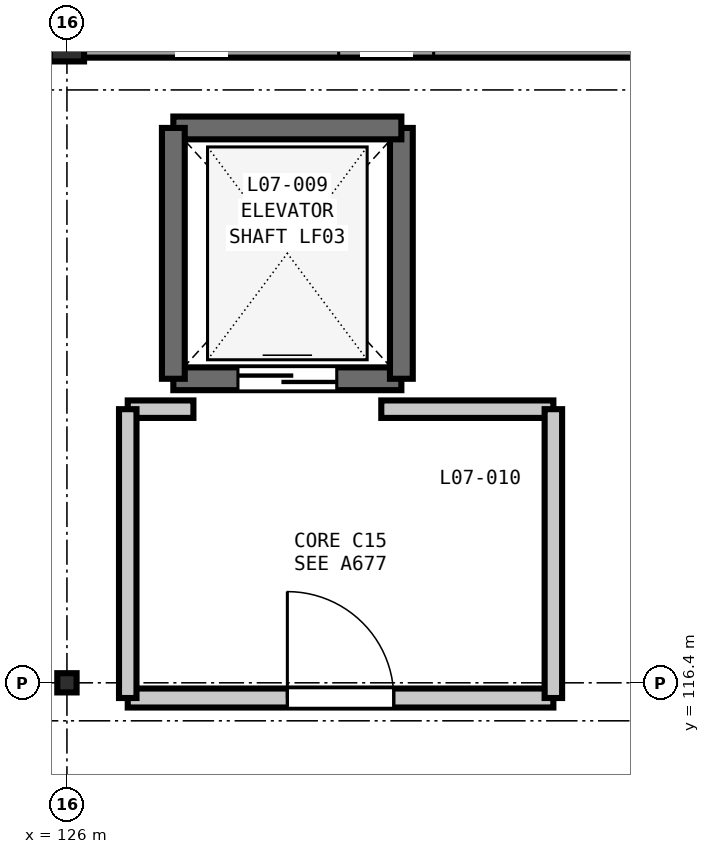
"""IFC4 building model, lengths in metres.
Left out: names, types, materials, properties, quantities, classifications, styles, units other than length and angle.
Written with IfcOpenShell. Run it as: python <this file> out.ifc"""

import sys

from ifc_helpers import new_model, si_unit, direction, frame, frame_2d, origin, origin_2d, place, context, subcontext, project, spatial, rectangle, i_section, extrude, element, fill, save


model = new_model("IFC4")
c1 = context("Model", 3, precision=1e-05, world=origin(), true_north=direction((0.0, 1.0)))
c2 = subcontext(c1, "Body", "Model", "MODEL_VIEW")
j1 = project(units=[si_unit("LENGTHUNIT", "METRE"), si_unit("PLANEANGLEUNIT", "RADIAN")], contexts=[c1])
p1 = place(None, origin())
s1 = spatial("IfcSite", under=j1, at=p1, CompositionType="ELEMENT")
p2 = place(p1, origin())
s2 = spatial("IfcBuilding", under=s1, at=p2, CompositionType="ELEMENT")
p3 = place(p2, frame((0.0, 0.0, 33.0)))
s3 = spatial("IfcBuildingStorey", under=s2, at=p3, CompositionType="ELEMENT", Elevation=33.0)
p4 = place(p3, frame((126.0, 116.4, 0.0), z_axis=(0.0, 0.0, 1.0), x_axis=(1.0, 0.0, 0.0)))
e1 = element("IfcColumn", 1, at=p4, inside=s3, PredefinedType="COLUMN", context=c2, shape_type="SweptSolid", body=[
    extrude(i_section(OverallWidth=0.254, OverallDepth=0.253, WebThickness=0.009, FlangeThickness=0.014, FilletRadius=0.013, at=origin_2d()), origin(), (0.0, 0.0, 1.0), 4.2),
])
p5 = place(p3, frame((126.0, 124.8, 0.0), z_axis=(0.0, 0.0, 1.0), x_axis=(1.0, 0.0, 0.0)))
e2 = element("IfcColumn", 2, at=p5, inside=s3, PredefinedType="COLUMN", context=c2, shape_type="SweptSolid", body=[
    extrude(rectangle(XDim=0.45, YDim=0.45, at=origin_2d()), origin(), (0.0, 0.0, 1.0), 4.2),
])
p6 = place(p3, frame((126.223, 124.8, 0.0), z_axis=(0.0, 0.0, 1.0), x_axis=(1.0, 0.0, 0.0)))
e3 = element("IfcWall", 3, at=p6, inside=s3, PredefinedType="SOLIDWALL", context=c2, shape_type="SweptSolid", body=[
    extrude(rectangle(XDim=7.954, YDim=0.35, at=frame_2d((3.977, 0.0))), origin(), (0.0, 0.0, 1.0), 3.48),
])
p7 = place(p6, frame((3.352, 0.0, 0.9)))
e4 = element("IfcOpeningElement", 4, at=p7, cuts=e3, PredefinedType="OPENING", context=c2, shape_type="SweptSolid", body=[
    extrude(rectangle(XDim=1.25, YDim=1.4, at=frame_2d((0.625, 0.7))), frame((0.0, 0.185, 0.0), z_axis=(0.0, -1.0, 0.0), x_axis=(1.0, 0.0, 0.0)), (0.0, 0.0, 1.0), 0.37),
])
p8 = place(p3, frame((127.4, 120.4, 0.0), z_axis=(0.0, 0.0, 1.0), x_axis=(1.0, 0.0, 0.0)))
e5 = element("IfcWall", 5, at=p8, inside=s3, PredefinedType="SHEAR", context=c2, shape_type="SweptSolid", body=[
    extrude(rectangle(XDim=3.0, YDim=0.3, at=frame_2d((1.5, 0.0))), origin(), (0.0, 0.0, 1.0), 4.2),
])
p9 = place(p8, frame((0.85, 0.0, 0.0)))
e6 = element("IfcOpeningElement", 6, at=p9, cuts=e5, PredefinedType="OPENING", context=c2, shape_type="SweptSolid", body=[
    extrude(rectangle(XDim=1.3, YDim=2.2, at=frame_2d((0.65, 1.1))), frame((0.0, 0.16, 0.0), z_axis=(0.0, -1.0, 0.0), x_axis=(1.0, 0.0, 0.0)), (0.0, 0.0, 1.0), 0.32),
])
p10 = place(p3, frame((130.4, 120.4, 0.0), z_axis=(0.0, 0.0, 1.0), x_axis=(0.0, 1.0, 0.0)))
e7 = element("IfcWall", 7, at=p10, inside=s3, PredefinedType="SHEAR", context=c2, shape_type="SweptSolid", body=[
    extrude(rectangle(XDim=3.3, YDim=0.3, at=frame_2d((1.65, 0.0))), origin(), (0.0, 0.0, 1.0), 4.2),
])
p11 = place(p3, frame((130.4, 123.7, 0.0), z_axis=(0.0, 0.0, 1.0), x_axis=(-1.0, 0.0, 0.0)))
e8 = element("IfcWall", 8, at=p11, inside=s3, PredefinedType="SHEAR", context=c2, shape_type="SweptSolid", body=[
    extrude(rectangle(XDim=3.0, YDim=0.3, at=frame_2d((1.5, 0.0))), origin(), (0.0, 0.0, 1.0), 4.2),
])
p12 = place(p3, frame((127.4, 123.7, 0.0), z_axis=(0.0, 0.0, 1.0), x_axis=(0.0, -1.0, 0.0)))
e9 = element("IfcWall", 9, at=p12, inside=s3, PredefinedType="SHEAR", context=c2, shape_type="SweptSolid", body=[
    extrude(rectangle(XDim=3.3, YDim=0.3, at=frame_2d((1.65, 0.0))), origin(), (0.0, 0.0, 1.0), 4.2),
])
p13 = place(p3, frame((126.8, 116.2, 0.0), z_axis=(0.0, 0.0, 1.0), x_axis=(1.0, 0.0, 0.0)))
e10 = element("IfcWall", 10, at=p13, inside=s3, PredefinedType="PARTITIONING", context=c2, shape_type="SweptSolid", body=[
    extrude(rectangle(XDim=5.6, YDim=0.25, at=frame_2d((2.8, 0.0))), origin(), (0.0, 0.0, 1.0), 3.685),
])
p14 = place(p13, frame((2.1, 0.0, 0.0)))
e11 = element("IfcOpeningElement", 11, at=p14, cuts=e10, PredefinedType="OPENING", context=c2, shape_type="SweptSolid", body=[
    extrude(rectangle(XDim=1.4, YDim=2.2, at=frame_2d((0.7, 1.1))), frame((0.0, 0.135, 0.0), z_axis=(0.0, -1.0, 0.0), x_axis=(1.0, 0.0, 0.0)), (0.0, 0.0, 1.0), 0.27),
])
p15 = place(p3, frame((130.136, 120.0, 0.0), z_axis=(0.0, 0.0, 1.0), x_axis=(1.0, 0.0, 0.0)))
e12 = element("IfcWall", 12, at=p15, inside=s3, PredefinedType="PARTITIONING", context=c2, shape_type="SweptSolid", body=[
    extrude(rectangle(XDim=2.264, YDim=0.23, at=frame_2d((1.132, 0.0))), origin(), (0.0, 0.0, 1.0), 3.92),
])
p16 = place(p3, frame((126.8, 120.0, 0.0), z_axis=(0.0, 0.0, 1.0), x_axis=(1.0, 0.0, 0.0)))
e13 = element("IfcWall", 13, at=p16, inside=s3, PredefinedType="PARTITIONING", context=c2, shape_type="SweptSolid", body=[
    extrude(rectangle(XDim=0.864, YDim=0.23, at=frame_2d((0.432, 0.0))), origin(), (0.0, 0.0, 1.0), 3.92),
])
for number, where, z_axis, x_axis in (
    (14, (126.8, 116.2, 0.0), (0.0, 0.0, 1.0), (0.0, 1.0, 0.0)),
    (15, (132.4, 116.2, 0.0), (0.0, 0.0, 1.0), (0.0, 1.0, 0.0)),
):
    element("IfcWall", number, at=place(p3, frame(where, z_axis=z_axis, x_axis=x_axis)), inside=s3, PredefinedType="PARTITIONING", context=c2, shape_type="SweptSolid", body=[
        extrude(rectangle(XDim=3.8, YDim=0.23, at=frame_2d((1.9, 0.0))), origin(), (0.0, 0.0, 1.0), 3.92),
    ])
p17 = place(p9, origin())
e16 = element("IfcDoor", 16, at=p17, inside=s3, OperationType="DOUBLE_DOOR_SLIDING", PredefinedType="DOOR", context=c2, shape_type="SweptSolid", body=[
    extrude(rectangle(XDim=1.3, YDim=2.2, at=frame_2d((0.65, 1.1))), frame((0.0, 0.025, 0.0), z_axis=(0.0, -1.0, 0.0), x_axis=(1.0, 0.0, 0.0)), (0.0, 0.0, 1.0), 0.05),
])
fill(e6, e16)
p18 = place(p14, origin())
e17 = element("IfcDoor", 17, at=p18, inside=s3, OperationType="SINGLE_SWING_LEFT", PredefinedType="DOOR", context=c2, shape_type="SweptSolid", body=[
    extrude(rectangle(XDim=1.4, YDim=2.2, at=frame_2d((0.7, 1.1))), frame((0.0, 0.025, 0.0), z_axis=(0.0, -1.0, 0.0), x_axis=(1.0, 0.0, 0.0)), (0.0, 0.0, 1.0), 0.05),
])
fill(e11, e17)
save(model, sys.argv[1])
